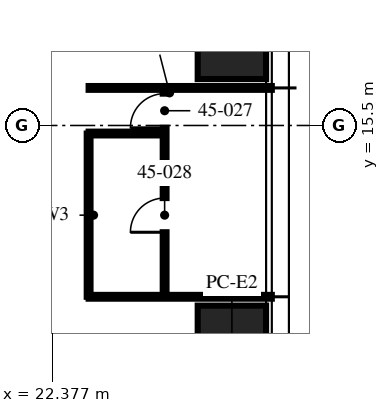
"""IFC4 building model, lengths in metres.
Left out: names, types, materials, properties, quantities, classifications, styles, units other than length and angle.
Written with IfcOpenShell. Run it as: python <this file> out.ifc"""

import sys

from ifc_helpers import new_model, si_unit, direction, frame, frame_2d, origin, origin_2d, place, context, subcontext, project, spatial, rectangle, hollow_rectangle, extrude, element, fill, save


model = new_model("IFC4")
c1 = context("Model", 3, precision=1e-05, world=origin(), true_north=direction((0.0, 1.0)))
c2 = subcontext(c1, "Body", "Model", "MODEL_VIEW")
j1 = project(units=[si_unit("LENGTHUNIT", "METRE"), si_unit("PLANEANGLEUNIT", "RADIAN")], contexts=[c1])
p1 = place(None, origin())
s1 = spatial("IfcSite", under=j1, at=p1, CompositionType="ELEMENT")
p2 = place(p1, origin())
s2 = spatial("IfcBuilding", under=s1, at=p2, CompositionType="ELEMENT")
p3 = place(p2, frame((0.0, 0.0, 178.5)))
s3 = spatial("IfcBuildingStorey", under=s2, at=p3, CompositionType="ELEMENT", Elevation=178.5)
for number, where, z_axis, x_axis in (
    (1, (27.1, 18.32, 0.0), (0.0, 0.0, 1.0), (0.0, 1.0, 0.0)),
    (2, (27.1, 9.16, 0.0), (0.0, 0.0, 1.0), (0.0, 1.0, 0.0)),
):
    element("IfcColumn", number, at=place(p3, frame(where, z_axis=z_axis, x_axis=x_axis)), inside=s3, PredefinedType="COLUMN", context=c2, shape_type="SweptSolid", body=[
        extrude(hollow_rectangle(XDim=3.2, YDim=1.8, WallThickness=0.2, at=origin_2d()), origin(), (0.0, 0.0, 1.0), 3.75),
    ])
for number, where, z_axis, x_axis in (
    (3, (23.33, 10.992, 0.0), (0.0, 0.0, 1.0), (1.0, 0.0, 0.0)),
    (4, (23.33, 16.488, 0.0), (0.0, 0.0, 1.0), (1.0, 0.0, 0.0)),
):
    element("IfcWall", number, at=place(p3, frame(where, z_axis=z_axis, x_axis=x_axis)), inside=s3, PredefinedType="PARTITIONING", context=c2, shape_type="SweptSolid", body=[
        extrude(rectangle(XDim=4.82, YDim=0.1, at=frame_2d((2.41, 0.0))), origin(), (0.0, 0.0, 1.0), 2.81),
    ])
p4 = place(p3, frame((25.33, 10.992, 0.0), z_axis=(0.0, 0.0, 1.0), x_axis=(0.0, 1.0, 0.0)))
e5 = element("IfcWall", 5, at=p4, inside=s3, PredefinedType="PARTITIONING", context=c2, shape_type="SweptSolid", body=[
    extrude(rectangle(XDim=5.496, YDim=0.1, at=frame_2d((2.748, 0.0))), origin(), (0.0, 0.0, 1.0), 2.81),
])
p5 = place(p4, frame((4.446, 0.0, 0.0)))
e6 = element("IfcOpeningElement", 6, at=p5, cuts=e5, PredefinedType="OPENING", context=c2, shape_type="SweptSolid", body=[
    extrude(rectangle(XDim=0.9, YDim=2.1, at=frame_2d((0.45, 1.05))), frame((0.0, 0.06, 0.0), z_axis=(0.0, -1.0, 0.0), x_axis=(1.0, 0.0, 0.0)), (0.0, 0.0, 1.0), 0.12),
])
p6 = place(p4, frame((1.698, 0.0, 0.0)))
e7 = element("IfcOpeningElement", 7, at=p6, cuts=e5, PredefinedType="OPENING", context=c2, shape_type="SweptSolid", body=[
    extrude(rectangle(XDim=0.9, YDim=2.1, at=frame_2d((0.45, 1.05))), frame((0.0, 0.06, 0.0), z_axis=(0.0, -1.0, 0.0), x_axis=(1.0, 0.0, 0.0)), (0.0, 0.0, 1.0), 0.12),
])
p7 = place(p3, frame((23.33, 15.288, 0.0), z_axis=(0.0, 0.0, 1.0), x_axis=(1.0, 0.0, 0.0)))
e8 = element("IfcWall", 8, at=p7, inside=s3, PredefinedType="PARTITIONING", context=c2, shape_type="SweptSolid", body=[
    extrude(rectangle(XDim=2.0, YDim=0.1, at=frame_2d((1.0, 0.0))), origin(), (0.0, 0.0, 1.0), 3.5),
])
p8 = place(p3, frame((23.33, 10.992, 0.0), z_axis=(0.0, 0.0, 1.0), x_axis=(0.0, 1.0, 0.0)))
e9 = element("IfcWall", 9, at=p8, inside=s3, PredefinedType="PARTITIONING", context=c2, shape_type="SweptSolid", body=[
    extrude(rectangle(XDim=4.296, YDim=0.1, at=frame_2d((2.148, 0.0))), origin(), (0.0, 0.0, 1.0), 2.81),
])
p9 = place(p5, origin())
e10 = element("IfcDoor", 10, at=p9, inside=s3, OperationType="SINGLE_SWING_LEFT", PredefinedType="DOOR", context=c2, shape_type="SweptSolid", body=[
    extrude(rectangle(XDim=0.9, YDim=2.1, at=frame_2d((0.45, 1.05))), frame((0.0, 0.025, 0.0), z_axis=(0.0, -1.0, 0.0), x_axis=(1.0, 0.0, 0.0)), (0.0, 0.0, 1.0), 0.05),
])
fill(e6, e10)
p10 = place(p6, origin())
e11 = element("IfcDoor", 11, at=p10, inside=s3, OperationType="SINGLE_SWING_LEFT", PredefinedType="DOOR", context=c2, shape_type="SweptSolid", body=[
    extrude(rectangle(XDim=0.9, YDim=2.1, at=frame_2d((0.45, 1.05))), frame((0.0, 0.025, 0.0), z_axis=(0.0, -1.0, 0.0), x_axis=(1.0, 0.0, 0.0)), (0.0, 0.0, 1.0), 0.05),
])
fill(e7, e11)
save(model, sys.argv[1])
